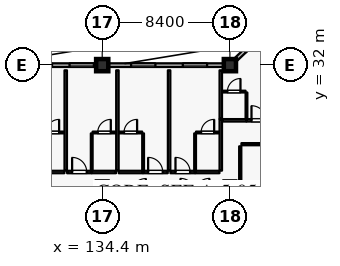
"""IFC4 building model, lengths in metres.
Left out: names, types, materials, properties, quantities, classifications, styles, units other than length and angle.
Written with IfcOpenShell. Run it as: python <this file> out.ifc"""

import sys

from ifc_helpers import new_model, si_unit, direction, frame, frame_2d, origin, origin_2d, place, context, subcontext, project, spatial, rectangle, extrude, element, fill, save


model = new_model("IFC4")
c1 = context("Model", 3, precision=1e-05, world=origin(), true_north=direction((0.0, 1.0)))
c2 = subcontext(c1, "Body", "Model", "MODEL_VIEW")
j1 = project(units=[si_unit("LENGTHUNIT", "METRE"), si_unit("PLANEANGLEUNIT", "RADIAN")], contexts=[c1])
p1 = place(None, origin())
s1 = spatial("IfcSite", under=j1, at=p1, CompositionType="ELEMENT")
p2 = place(p1, origin())
s2 = spatial("IfcBuilding", under=s1, at=p2, CompositionType="ELEMENT")
p3 = place(p2, frame((0.0, 0.0, 21.0)))
s3 = spatial("IfcBuildingStorey", under=s2, at=p3, CompositionType="ELEMENT", Elevation=21.0)
for number, where, z_axis, x_axis in (
    (1, (134.4, 32.0, 0.0), (0.0, 0.0, 1.0), (1.0, 0.0, 0.0)),
    (2, (142.8, 32.0, 0.0), (0.0, 0.0, 1.0), (1.0, 0.0, 0.0)),
):
    element("IfcColumn", number, at=place(p3, frame(where, z_axis=z_axis, x_axis=x_axis)), inside=s3, PredefinedType="COLUMN", context=c2, shape_type="SweptSolid", body=[
        extrude(rectangle(XDim=0.8, YDim=0.8, at=origin_2d()), origin(), (0.0, 0.0, 1.0), 4.2),
    ])
for number, where, z_axis, x_axis in (
    (3, (134.4, 24.0, 0.0), (0.0, 0.0, 1.0), (1.0, 0.0, 0.0)),
    (4, (142.8, 24.0, 0.0), (0.0, 0.0, 1.0), (1.0, 0.0, 0.0)),
):
    element("IfcColumn", number, at=place(p3, frame(where, z_axis=z_axis, x_axis=x_axis)), inside=s3, PredefinedType="COLUMN", context=c2, shape_type="SweptSolid", body=[
        extrude(rectangle(XDim=0.7, YDim=0.7, at=origin_2d()), origin(), (0.0, 0.0, 1.0), 4.2),
    ])
p4 = place(p3, frame((126.4, 32.0, 0.0), z_axis=(0.0, 0.0, 1.0), x_axis=(1.0, 0.0, 0.0)))
e5 = element("IfcWall", 5, at=p4, inside=s3, PredefinedType="SOLIDWALL", context=c2, shape_type="SweptSolid", body=[
    extrude(rectangle(XDim=7.6, YDim=0.24, at=frame_2d((3.8, 0.0))), origin(), (0.0, 0.0, 1.0), 3.53),
])
p5 = place(p4, frame((0.25, 0.0, 0.8)))
e6 = element("IfcOpeningElement", 6, at=p5, cuts=e5, PredefinedType="OPENING", context=c2, shape_type="SweptSolid", body=[
    extrude(rectangle(XDim=1.6, YDim=1.6, at=frame_2d((0.8, 0.8))), frame((0.0, 0.13, 0.0), z_axis=(0.0, -1.0, 0.0), x_axis=(1.0, 0.0, 0.0)), (0.0, 0.0, 1.0), 0.26),
])
p6 = place(p4, frame((3.1, 0.0, 0.8)))
e7 = element("IfcOpeningElement", 7, at=p6, cuts=e5, PredefinedType="OPENING", context=c2, shape_type="SweptSolid", body=[
    extrude(rectangle(XDim=1.6, YDim=1.6, at=frame_2d((0.8, 0.8))), frame((0.0, 0.13, 0.0), z_axis=(0.0, -1.0, 0.0), x_axis=(1.0, 0.0, 0.0)), (0.0, 0.0, 1.0), 0.26),
])
p7 = place(p4, frame((5.85, 0.0, 0.8)))
e8 = element("IfcOpeningElement", 8, at=p7, cuts=e5, PredefinedType="OPENING", context=c2, shape_type="SweptSolid", body=[
    extrude(rectangle(XDim=1.6, YDim=1.6, at=frame_2d((0.8, 0.8))), frame((0.0, 0.13, 0.0), z_axis=(0.0, -1.0, 0.0), x_axis=(1.0, 0.0, 0.0)), (0.0, 0.0, 1.0), 0.26),
])
p8 = place(p3, frame((134.8, 32.0, 0.0), z_axis=(0.0, 0.0, 1.0), x_axis=(1.0, 0.0, 0.0)))
e9 = element("IfcWall", 9, at=p8, inside=s3, PredefinedType="SOLIDWALL", context=c2, shape_type="SweptSolid", body=[
    extrude(rectangle(XDim=7.6, YDim=0.24, at=frame_2d((3.8, 0.0))), origin(), (0.0, 0.0, 1.0), 3.53),
])
p9 = place(p8, frame((1.5, 0.0, 0.8)))
e10 = element("IfcOpeningElement", 10, at=p9, cuts=e9, PredefinedType="OPENING", context=c2, shape_type="SweptSolid", body=[
    extrude(rectangle(XDim=1.6, YDim=1.6, at=frame_2d((0.8, 0.8))), frame((0.0, 0.13, 0.0), z_axis=(0.0, -1.0, 0.0), x_axis=(1.0, 0.0, 0.0)), (0.0, 0.0, 1.0), 0.26),
])
p10 = place(p8, frame((4.9, 0.0, 0.8)))
e11 = element("IfcOpeningElement", 11, at=p10, cuts=e9, PredefinedType="OPENING", context=c2, shape_type="SweptSolid", body=[
    extrude(rectangle(XDim=1.6, YDim=1.6, at=frame_2d((0.8, 0.8))), frame((0.0, 0.13, 0.0), z_axis=(0.0, -1.0, 0.0), x_axis=(1.0, 0.0, 0.0)), (0.0, 0.0, 1.0), 0.26),
])
p11 = place(p3, frame((143.2, 32.381, 0.0), z_axis=(0.0, 0.0, 1.0), x_axis=(0.724156739794, 0.689635422677, 0.0)))
e12 = element("IfcWall", 12, at=p11, inside=s3, PredefinedType="SOLIDWALL", context=c2, shape_type="SweptSolid", body=[
    extrude(rectangle(XDim=10.495, YDim=0.24, at=frame_2d((5.248, 0.0))), origin(), (0.0, 0.0, 1.0), 3.53),
])
p12 = place(p11, frame((0.788, 0.0, 0.8)))
e13 = element("IfcOpeningElement", 13, at=p12, cuts=e12, PredefinedType="OPENING", context=c2, shape_type="SweptSolid", body=[
    extrude(rectangle(XDim=1.6, YDim=1.6, at=frame_2d((0.8, 0.8))), frame((0.0, 0.13, 0.0), z_axis=(0.0, -1.0, 0.0), x_axis=(1.0, 0.0, 0.0)), (0.0, 0.0, 1.0), 0.26),
])
p13 = place(p11, frame((4.862, 0.0, 0.8)))
e14 = element("IfcOpeningElement", 14, at=p13, cuts=e12, PredefinedType="OPENING", context=c2, shape_type="SweptSolid", body=[
    extrude(rectangle(XDim=1.6, YDim=1.6, at=frame_2d((0.8, 0.8))), frame((0.0, 0.13, 0.0), z_axis=(0.0, -1.0, 0.0), x_axis=(1.0, 0.0, 0.0)), (0.0, 0.0, 1.0), 0.26),
])
p14 = place(p11, frame((8.521, 0.0, 0.8)))
e15 = element("IfcOpeningElement", 15, at=p14, cuts=e12, PredefinedType="OPENING", context=c2, shape_type="SweptSolid", body=[
    extrude(rectangle(XDim=1.6, YDim=1.6, at=frame_2d((0.8, 0.8))), frame((0.0, 0.13, 0.0), z_axis=(0.0, -1.0, 0.0), x_axis=(1.0, 0.0, 0.0)), (0.0, 0.0, 1.0), 0.26),
])
p15 = place(p3, frame((130.32, 24.97, 0.0), z_axis=(0.0, 0.0, 1.0), x_axis=(1.0, 0.0, 0.0)))
e16 = element("IfcWall", 16, at=p15, inside=s3, PredefinedType="PARTITIONING", context=c2, shape_type="SweptSolid", body=[
    extrude(rectangle(XDim=1.59, YDim=0.16, at=frame_2d((0.795, 0.0))), origin(), (0.0, 0.0, 1.0), 3.965),
])
p16 = place(p3, frame((130.37, 27.57, 0.0), z_axis=(0.0, 0.0, 1.0), x_axis=(1.0, 0.0, 0.0)))
e17 = element("IfcWall", 17, at=p16, inside=s3, PredefinedType="PARTITIONING", context=c2, shape_type="SweptSolid", body=[
    extrude(rectangle(XDim=1.53, YDim=0.115, at=frame_2d((0.765, 0.0))), origin(), (0.0, 0.0, 1.0), 3.965),
])
p17 = place(p16, frame((0.335, 0.0, 0.0)))
e18 = element("IfcOpeningElement", 18, at=p17, cuts=e17, PredefinedType="OPENING", context=c2, shape_type="SweptSolid", body=[
    extrude(rectangle(XDim=0.86, YDim=2.12, at=frame_2d((0.43, 1.06))), frame((0.0, 0.067, 0.0), z_axis=(0.0, -1.0, 0.0), x_axis=(1.0, 0.0, 0.0)), (0.0, 0.0, 1.0), 0.135),
])
p18 = place(p3, frame((132.09, 24.97, 0.0), z_axis=(0.0, 0.0, 1.0), x_axis=(1.0, 0.0, 0.0)))
e19 = element("IfcWall", 19, at=p18, inside=s3, PredefinedType="PARTITIONING", context=c2, shape_type="SweptSolid", body=[
    extrude(rectangle(XDim=1.62, YDim=0.16, at=frame_2d((0.81, 0.0))), origin(), (0.0, 0.0, 1.0), 3.965),
])
p19 = place(p18, frame((0.33, 0.0, 0.0)))
e20 = element("IfcOpeningElement", 20, at=p19, cuts=e19, PredefinedType="OPENING", context=c2, shape_type="SweptSolid", body=[
    extrude(rectangle(XDim=0.96, YDim=2.2, at=frame_2d((0.48, 1.1))), frame((0.0, 0.09, 0.0), z_axis=(0.0, -1.0, 0.0), x_axis=(1.0, 0.0, 0.0)), (0.0, 0.0, 1.0), 0.18),
])
p20 = place(p3, frame((133.72, 24.97, 0.0), z_axis=(0.0, 0.0, 1.0), x_axis=(1.0, 0.0, 0.0)))
e21 = element("IfcWall", 21, at=p20, inside=s3, PredefinedType="PARTITIONING", context=c2, shape_type="SweptSolid", body=[
    extrude(rectangle(XDim=1.59, YDim=0.16, at=frame_2d((0.795, 0.0))), origin(), (0.0, 0.0, 1.0), 3.965),
])
p21 = place(p3, frame((133.71, 25.06, 0.0), z_axis=(0.0, 0.0, 1.0), x_axis=(0.0, 1.0, 0.0)))
e22 = element("IfcWall", 22, at=p21, inside=s3, PredefinedType="PARTITIONING", context=c2, shape_type="SweptSolid", body=[
    extrude(rectangle(XDim=2.45, YDim=0.115, at=frame_2d((1.225, 0.0))), origin(), (0.0, 0.0, 1.0), 3.965),
])
p22 = place(p3, frame((133.77, 27.57, 0.0), z_axis=(0.0, 0.0, 1.0), x_axis=(1.0, 0.0, 0.0)))
e23 = element("IfcWall", 23, at=p22, inside=s3, PredefinedType="PARTITIONING", context=c2, shape_type="SweptSolid", body=[
    extrude(rectangle(XDim=1.53, YDim=0.115, at=frame_2d((0.765, 0.0))), origin(), (0.0, 0.0, 1.0), 3.965),
])
p23 = place(p22, frame((0.335, 0.0, 0.0)))
e24 = element("IfcOpeningElement", 24, at=p23, cuts=e23, PredefinedType="OPENING", context=c2, shape_type="SweptSolid", body=[
    extrude(rectangle(XDim=0.86, YDim=2.12, at=frame_2d((0.43, 1.06))), frame((0.0, 0.067, 0.0), z_axis=(0.0, -1.0, 0.0), x_axis=(1.0, 0.0, 0.0)), (0.0, 0.0, 1.0), 0.135),
])
p24 = place(p3, frame((132.0, 25.06, 0.0), z_axis=(0.0, 0.0, 1.0), x_axis=(0.0, 1.0, 0.0)))
e25 = element("IfcWall", 25, at=p24, inside=s3, PredefinedType="PARTITIONING", context=c2, shape_type="SweptSolid", body=[
    extrude(rectangle(XDim=6.6, YDim=0.16, at=frame_2d((3.3, 0.0))), origin(), (0.0, 0.0, 1.0), 3.965),
])
p25 = place(p3, frame((135.49, 24.97, 0.0), z_axis=(0.0, 0.0, 1.0), x_axis=(1.0, 0.0, 0.0)))
e26 = element("IfcWall", 26, at=p25, inside=s3, PredefinedType="PARTITIONING", context=c2, shape_type="SweptSolid", body=[
    extrude(rectangle(XDim=1.59, YDim=0.16, at=frame_2d((0.795, 0.0))), origin(), (0.0, 0.0, 1.0), 3.965),
])
p26 = place(p3, frame((137.09, 24.97, 0.0), z_axis=(0.0, 0.0, 1.0), x_axis=(1.0, 0.0, 0.0)))
e27 = element("IfcWall", 27, at=p26, inside=s3, PredefinedType="PARTITIONING", context=c2, shape_type="SweptSolid", body=[
    extrude(rectangle(XDim=1.62, YDim=0.16, at=frame_2d((0.81, 0.0))), origin(), (0.0, 0.0, 1.0), 3.965),
])
p27 = place(p26, frame((0.33, 0.0, 0.0)))
e28 = element("IfcOpeningElement", 28, at=p27, cuts=e27, PredefinedType="OPENING", context=c2, shape_type="SweptSolid", body=[
    extrude(rectangle(XDim=0.96, YDim=2.2, at=frame_2d((0.48, 1.1))), frame((0.0, 0.09, 0.0), z_axis=(0.0, -1.0, 0.0), x_axis=(1.0, 0.0, 0.0)), (0.0, 0.0, 1.0), 0.18),
])
p28 = place(p3, frame((137.09, 25.06, 0.0), z_axis=(0.0, 0.0, 1.0), x_axis=(0.0, 1.0, 0.0)))
e29 = element("IfcWall", 29, at=p28, inside=s3, PredefinedType="PARTITIONING", context=c2, shape_type="SweptSolid", body=[
    extrude(rectangle(XDim=2.45, YDim=0.115, at=frame_2d((1.225, 0.0))), origin(), (0.0, 0.0, 1.0), 3.965),
])
p29 = place(p3, frame((135.5, 27.57, 0.0), z_axis=(0.0, 0.0, 1.0), x_axis=(1.0, 0.0, 0.0)))
e30 = element("IfcWall", 30, at=p29, inside=s3, PredefinedType="PARTITIONING", context=c2, shape_type="SweptSolid", body=[
    extrude(rectangle(XDim=1.53, YDim=0.115, at=frame_2d((0.765, 0.0))), origin(), (0.0, 0.0, 1.0), 3.965),
])
p30 = place(p29, frame((0.335, 0.0, 0.0)))
e31 = element("IfcOpeningElement", 31, at=p30, cuts=e30, PredefinedType="OPENING", context=c2, shape_type="SweptSolid", body=[
    extrude(rectangle(XDim=0.86, YDim=2.12, at=frame_2d((0.43, 1.06))), frame((0.0, 0.067, 0.0), z_axis=(0.0, -1.0, 0.0), x_axis=(1.0, 0.0, 0.0)), (0.0, 0.0, 1.0), 0.135),
])
p31 = place(p3, frame((135.4, 25.06, 0.0), z_axis=(0.0, 0.0, 1.0), x_axis=(0.0, 1.0, 0.0)))
e32 = element("IfcWall", 32, at=p31, inside=s3, PredefinedType="PARTITIONING", context=c2, shape_type="SweptSolid", body=[
    extrude(rectangle(XDim=6.6, YDim=0.16, at=frame_2d((3.3, 0.0))), origin(), (0.0, 0.0, 1.0), 3.965),
])
p32 = place(p3, frame((138.89, 24.97, 0.0), z_axis=(0.0, 0.0, 1.0), x_axis=(1.0, 0.0, 0.0)))
e33 = element("IfcWall", 33, at=p32, inside=s3, PredefinedType="PARTITIONING", context=c2, shape_type="SweptSolid", body=[
    extrude(rectangle(XDim=1.62, YDim=0.16, at=frame_2d((0.81, 0.0))), origin(), (0.0, 0.0, 1.0), 3.965),
])
p33 = place(p32, frame((0.33, 0.0, 0.0)))
e34 = element("IfcOpeningElement", 34, at=p33, cuts=e33, PredefinedType="OPENING", context=c2, shape_type="SweptSolid", body=[
    extrude(rectangle(XDim=0.96, YDim=2.2, at=frame_2d((0.48, 1.1))), frame((0.0, 0.09, 0.0), z_axis=(0.0, -1.0, 0.0), x_axis=(1.0, 0.0, 0.0)), (0.0, 0.0, 1.0), 0.18),
])
p34 = place(p3, frame((140.52, 24.97, 0.0), z_axis=(0.0, 0.0, 1.0), x_axis=(1.0, 0.0, 0.0)))
e35 = element("IfcWall", 35, at=p34, inside=s3, PredefinedType="PARTITIONING", context=c2, shape_type="SweptSolid", body=[
    extrude(rectangle(XDim=1.59, YDim=0.16, at=frame_2d((0.795, 0.0))), origin(), (0.0, 0.0, 1.0), 3.965),
])
p35 = place(p3, frame((140.51, 25.06, 0.0), z_axis=(0.0, 0.0, 1.0), x_axis=(0.0, 1.0, 0.0)))
e36 = element("IfcWall", 36, at=p35, inside=s3, PredefinedType="PARTITIONING", context=c2, shape_type="SweptSolid", body=[
    extrude(rectangle(XDim=2.45, YDim=0.115, at=frame_2d((1.225, 0.0))), origin(), (0.0, 0.0, 1.0), 3.965),
])
p36 = place(p3, frame((140.57, 27.57, 0.0), z_axis=(0.0, 0.0, 1.0), x_axis=(1.0, 0.0, 0.0)))
e37 = element("IfcWall", 37, at=p36, inside=s3, PredefinedType="PARTITIONING", context=c2, shape_type="SweptSolid", body=[
    extrude(rectangle(XDim=1.53, YDim=0.115, at=frame_2d((0.765, 0.0))), origin(), (0.0, 0.0, 1.0), 3.965),
])
p37 = place(p36, frame((0.335, 0.0, 0.0)))
e38 = element("IfcOpeningElement", 38, at=p37, cuts=e37, PredefinedType="OPENING", context=c2, shape_type="SweptSolid", body=[
    extrude(rectangle(XDim=0.86, YDim=2.12, at=frame_2d((0.43, 1.06))), frame((0.0, 0.067, 0.0), z_axis=(0.0, -1.0, 0.0), x_axis=(1.0, 0.0, 0.0)), (0.0, 0.0, 1.0), 0.135),
])
p38 = place(p3, frame((138.8, 25.06, 0.0), z_axis=(0.0, 0.0, 1.0), x_axis=(0.0, 1.0, 0.0)))
e39 = element("IfcWall", 39, at=p38, inside=s3, PredefinedType="PARTITIONING", context=c2, shape_type="SweptSolid", body=[
    extrude(rectangle(XDim=6.6, YDim=0.16, at=frame_2d((3.3, 0.0))), origin(), (0.0, 0.0, 1.0), 3.965),
])
p39 = place(p3, frame((142.2, 25.06, 0.0), z_axis=(0.0, 0.0, 1.0), x_axis=(0.0, 1.0, 0.0)))
e40 = element("IfcWall", 40, at=p39, inside=s3, PredefinedType="PARTITIONING", context=c2, shape_type="SweptSolid", body=[
    extrude(rectangle(XDim=3.39, YDim=0.16, at=frame_2d((1.695, 0.0))), origin(), (0.0, 0.0, 1.0), 3.965),
])
p40 = place(p3, frame((142.29, 28.37, 0.0), z_axis=(0.0, 0.0, 1.0), x_axis=(1.0, 0.0, 0.0)))
e41 = element("IfcWall", 41, at=p40, inside=s3, PredefinedType="PARTITIONING", context=c2, shape_type="SweptSolid", body=[
    extrude(rectangle(XDim=1.59, YDim=0.16, at=frame_2d((0.795, 0.0))), origin(), (0.0, 0.0, 1.0), 3.965),
])
p41 = place(p3, frame((143.89, 28.37, 0.0), z_axis=(0.0, 0.0, 1.0), x_axis=(1.0, 0.0, 0.0)))
e42 = element("IfcWall", 42, at=p41, inside=s3, PredefinedType="PARTITIONING", context=c2, shape_type="SweptSolid", body=[
    extrude(rectangle(XDim=1.62, YDim=0.16, at=frame_2d((0.81, 0.0))), origin(), (0.0, 0.0, 1.0), 3.965),
])
p42 = place(p41, frame((0.33, 0.0, 0.0)))
e43 = element("IfcOpeningElement", 43, at=p42, cuts=e42, PredefinedType="OPENING", context=c2, shape_type="SweptSolid", body=[
    extrude(rectangle(XDim=0.96, YDim=2.2, at=frame_2d((0.48, 1.1))), frame((0.0, 0.09, 0.0), z_axis=(0.0, -1.0, 0.0), x_axis=(1.0, 0.0, 0.0)), (0.0, 0.0, 1.0), 0.18),
])
p43 = place(p3, frame((143.89, 28.46, 0.0), z_axis=(0.0, 0.0, 1.0), x_axis=(0.0, 1.0, 0.0)))
e44 = element("IfcWall", 44, at=p43, inside=s3, PredefinedType="PARTITIONING", context=c2, shape_type="SweptSolid", body=[
    extrude(rectangle(XDim=1.74, YDim=0.115, at=frame_2d((0.87, 0.0))), origin(), (0.0, 0.0, 1.0), 3.965),
])
p44 = place(p3, frame((142.3, 30.26, 0.0), z_axis=(0.0, 0.0, 1.0), x_axis=(1.0, 0.0, 0.0)))
e45 = element("IfcWall", 45, at=p44, inside=s3, PredefinedType="PARTITIONING", context=c2, shape_type="SweptSolid", body=[
    extrude(rectangle(XDim=1.53, YDim=0.115, at=frame_2d((0.765, 0.0))), origin(), (0.0, 0.0, 1.0), 3.965),
])
p45 = place(p44, frame((0.335, 0.0, 0.0)))
e46 = element("IfcOpeningElement", 46, at=p45, cuts=e45, PredefinedType="OPENING", context=c2, shape_type="SweptSolid", body=[
    extrude(rectangle(XDim=0.86, YDim=2.12, at=frame_2d((0.43, 1.06))), frame((0.0, 0.067, 0.0), z_axis=(0.0, -1.0, 0.0), x_axis=(1.0, 0.0, 0.0)), (0.0, 0.0, 1.0), 0.135),
])
p46 = place(p3, frame((142.2, 28.46, 0.0), z_axis=(0.0, 0.0, 1.0), x_axis=(0.0, 1.0, 0.0)))
e47 = element("IfcWall", 47, at=p46, inside=s3, PredefinedType="PARTITIONING", context=c2, shape_type="SweptSolid", body=[
    extrude(rectangle(XDim=3.2, YDim=0.16, at=frame_2d((1.6, 0.0))), origin(), (0.0, 0.0, 1.0), 3.965),
])
p47 = place(p3, frame((143.56, 26.8, 0.0), z_axis=(0.0, 0.0, 1.0), x_axis=(1.0, 0.0, 0.0)))
e48 = element("IfcWall", 48, at=p47, inside=s3, PredefinedType="PARTITIONING", context=c2, shape_type="SweptSolid", body=[
    extrude(rectangle(XDim=7.08, YDim=0.14, at=frame_2d((3.54, 0.0))), origin(), (0.0, 0.0, 1.0), 3.965),
])
p48 = place(p47, frame((2.59, 0.0, 0.0)))
e49 = element("IfcOpeningElement", 49, at=p48, cuts=e48, PredefinedType="OPENING", context=c2, shape_type="SweptSolid", body=[
    extrude(rectangle(XDim=1.9, YDim=2.4, at=frame_2d((0.95, 1.2))), frame((0.0, 0.08, 0.0), z_axis=(0.0, -1.0, 0.0), x_axis=(1.0, 0.0, 0.0)), (0.0, 0.0, 1.0), 0.16),
])
p49 = place(p3, frame((143.48, 23.45, 0.0), z_axis=(0.0, 0.0, 1.0), x_axis=(0.0, 1.0, 0.0)))
e50 = element("IfcWall", 50, at=p49, inside=s3, PredefinedType="PARTITIONING", context=c2, shape_type="SweptSolid", body=[
    extrude(rectangle(XDim=3.21, YDim=0.14, at=frame_2d((1.605, 0.0))), origin(), (0.0, 0.0, 1.0), 3.965),
])
p50 = place(p7, origin())
e51 = element("IfcWindow", 51, at=p50, inside=s3, PartitioningType="SINGLE_PANEL", PredefinedType="WINDOW", context=c2, shape_type="SweptSolid", body=[
    extrude(rectangle(XDim=1.6, YDim=1.6, at=frame_2d((0.8, 0.8))), frame((0.0, 0.03, 0.0), z_axis=(0.0, -1.0, 0.0), x_axis=(1.0, 0.0, 0.0)), (0.0, 0.0, 1.0), 0.06),
])
fill(e8, e51)
p51 = place(p9, origin())
e52 = element("IfcWindow", 52, at=p51, inside=s3, PartitioningType="SINGLE_PANEL", PredefinedType="WINDOW", context=c2, shape_type="SweptSolid", body=[
    extrude(rectangle(XDim=1.6, YDim=1.6, at=frame_2d((0.8, 0.8))), frame((0.0, 0.03, 0.0), z_axis=(0.0, -1.0, 0.0), x_axis=(1.0, 0.0, 0.0)), (0.0, 0.0, 1.0), 0.06),
])
fill(e10, e52)
p52 = place(p10, origin())
e53 = element("IfcWindow", 53, at=p52, inside=s3, PartitioningType="SINGLE_PANEL", PredefinedType="WINDOW", context=c2, shape_type="SweptSolid", body=[
    extrude(rectangle(XDim=1.6, YDim=1.6, at=frame_2d((0.8, 0.8))), frame((0.0, 0.03, 0.0), z_axis=(0.0, -1.0, 0.0), x_axis=(1.0, 0.0, 0.0)), (0.0, 0.0, 1.0), 0.06),
])
fill(e11, e53)
p53 = place(p17, origin())
e54 = element("IfcDoor", 54, at=p53, inside=s3, OperationType="SINGLE_SWING_RIGHT", PredefinedType="DOOR", context=c2, shape_type="SweptSolid", body=[
    extrude(rectangle(XDim=0.86, YDim=2.12, at=frame_2d((0.43, 1.06))), frame((0.0, 0.025, 0.0), z_axis=(0.0, -1.0, 0.0), x_axis=(1.0, 0.0, 0.0)), (0.0, 0.0, 1.0), 0.05),
])
fill(e18, e54)
p54 = place(p19, origin())
e55 = element("IfcDoor", 55, at=p54, inside=s3, OperationType="SINGLE_SWING_LEFT", PredefinedType="DOOR", context=c2, shape_type="SweptSolid", body=[
    extrude(rectangle(XDim=0.96, YDim=2.2, at=frame_2d((0.48, 1.1))), frame((0.0, 0.025, 0.0), z_axis=(0.0, -1.0, 0.0), x_axis=(1.0, 0.0, 0.0)), (0.0, 0.0, 1.0), 0.05),
])
fill(e20, e55)
p55 = place(p23, origin())
e56 = element("IfcDoor", 56, at=p55, inside=s3, OperationType="SINGLE_SWING_RIGHT", PredefinedType="DOOR", context=c2, shape_type="SweptSolid", body=[
    extrude(rectangle(XDim=0.86, YDim=2.12, at=frame_2d((0.43, 1.06))), frame((0.0, 0.025, 0.0), z_axis=(0.0, -1.0, 0.0), x_axis=(1.0, 0.0, 0.0)), (0.0, 0.0, 1.0), 0.05),
])
fill(e24, e56)
p56 = place(p27, origin())
e57 = element("IfcDoor", 57, at=p56, inside=s3, OperationType="SINGLE_SWING_LEFT", PredefinedType="DOOR", context=c2, shape_type="SweptSolid", body=[
    extrude(rectangle(XDim=0.96, YDim=2.2, at=frame_2d((0.48, 1.1))), frame((0.0, 0.025, 0.0), z_axis=(0.0, -1.0, 0.0), x_axis=(1.0, 0.0, 0.0)), (0.0, 0.0, 1.0), 0.05),
])
fill(e28, e57)
p57 = place(p30, origin())
e58 = element("IfcDoor", 58, at=p57, inside=s3, OperationType="SINGLE_SWING_RIGHT", PredefinedType="DOOR", context=c2, shape_type="SweptSolid", body=[
    extrude(rectangle(XDim=0.86, YDim=2.12, at=frame_2d((0.43, 1.06))), frame((0.0, 0.025, 0.0), z_axis=(0.0, -1.0, 0.0), x_axis=(1.0, 0.0, 0.0)), (0.0, 0.0, 1.0), 0.05),
])
fill(e31, e58)
p58 = place(p33, origin())
e59 = element("IfcDoor", 59, at=p58, inside=s3, OperationType="SINGLE_SWING_LEFT", PredefinedType="DOOR", context=c2, shape_type="SweptSolid", body=[
    extrude(rectangle(XDim=0.96, YDim=2.2, at=frame_2d((0.48, 1.1))), frame((0.0, 0.025, 0.0), z_axis=(0.0, -1.0, 0.0), x_axis=(1.0, 0.0, 0.0)), (0.0, 0.0, 1.0), 0.05),
])
fill(e34, e59)
p59 = place(p37, origin())
e60 = element("IfcDoor", 60, at=p59, inside=s3, OperationType="SINGLE_SWING_RIGHT", PredefinedType="DOOR", context=c2, shape_type="SweptSolid", body=[
    extrude(rectangle(XDim=0.86, YDim=2.12, at=frame_2d((0.43, 1.06))), frame((0.0, 0.025, 0.0), z_axis=(0.0, -1.0, 0.0), x_axis=(1.0, 0.0, 0.0)), (0.0, 0.0, 1.0), 0.05),
])
fill(e38, e60)
p60 = place(p42, origin())
e61 = element("IfcDoor", 61, at=p60, inside=s3, OperationType="SINGLE_SWING_LEFT", PredefinedType="DOOR", context=c2, shape_type="SweptSolid", body=[
    extrude(rectangle(XDim=0.96, YDim=2.2, at=frame_2d((0.48, 1.1))), frame((0.0, 0.025, 0.0), z_axis=(0.0, -1.0, 0.0), x_axis=(1.0, 0.0, 0.0)), (0.0, 0.0, 1.0), 0.05),
])
fill(e43, e61)
p61 = place(p45, origin())
e62 = element("IfcDoor", 62, at=p61, inside=s3, OperationType="SINGLE_SWING_RIGHT", PredefinedType="DOOR", context=c2, shape_type="SweptSolid", body=[
    extrude(rectangle(XDim=0.86, YDim=2.12, at=frame_2d((0.43, 1.06))), frame((0.0, 0.025, 0.0), z_axis=(0.0, -1.0, 0.0), x_axis=(1.0, 0.0, 0.0)), (0.0, 0.0, 1.0), 0.05),
])
fill(e46, e62)
save(model, sys.argv[1])
